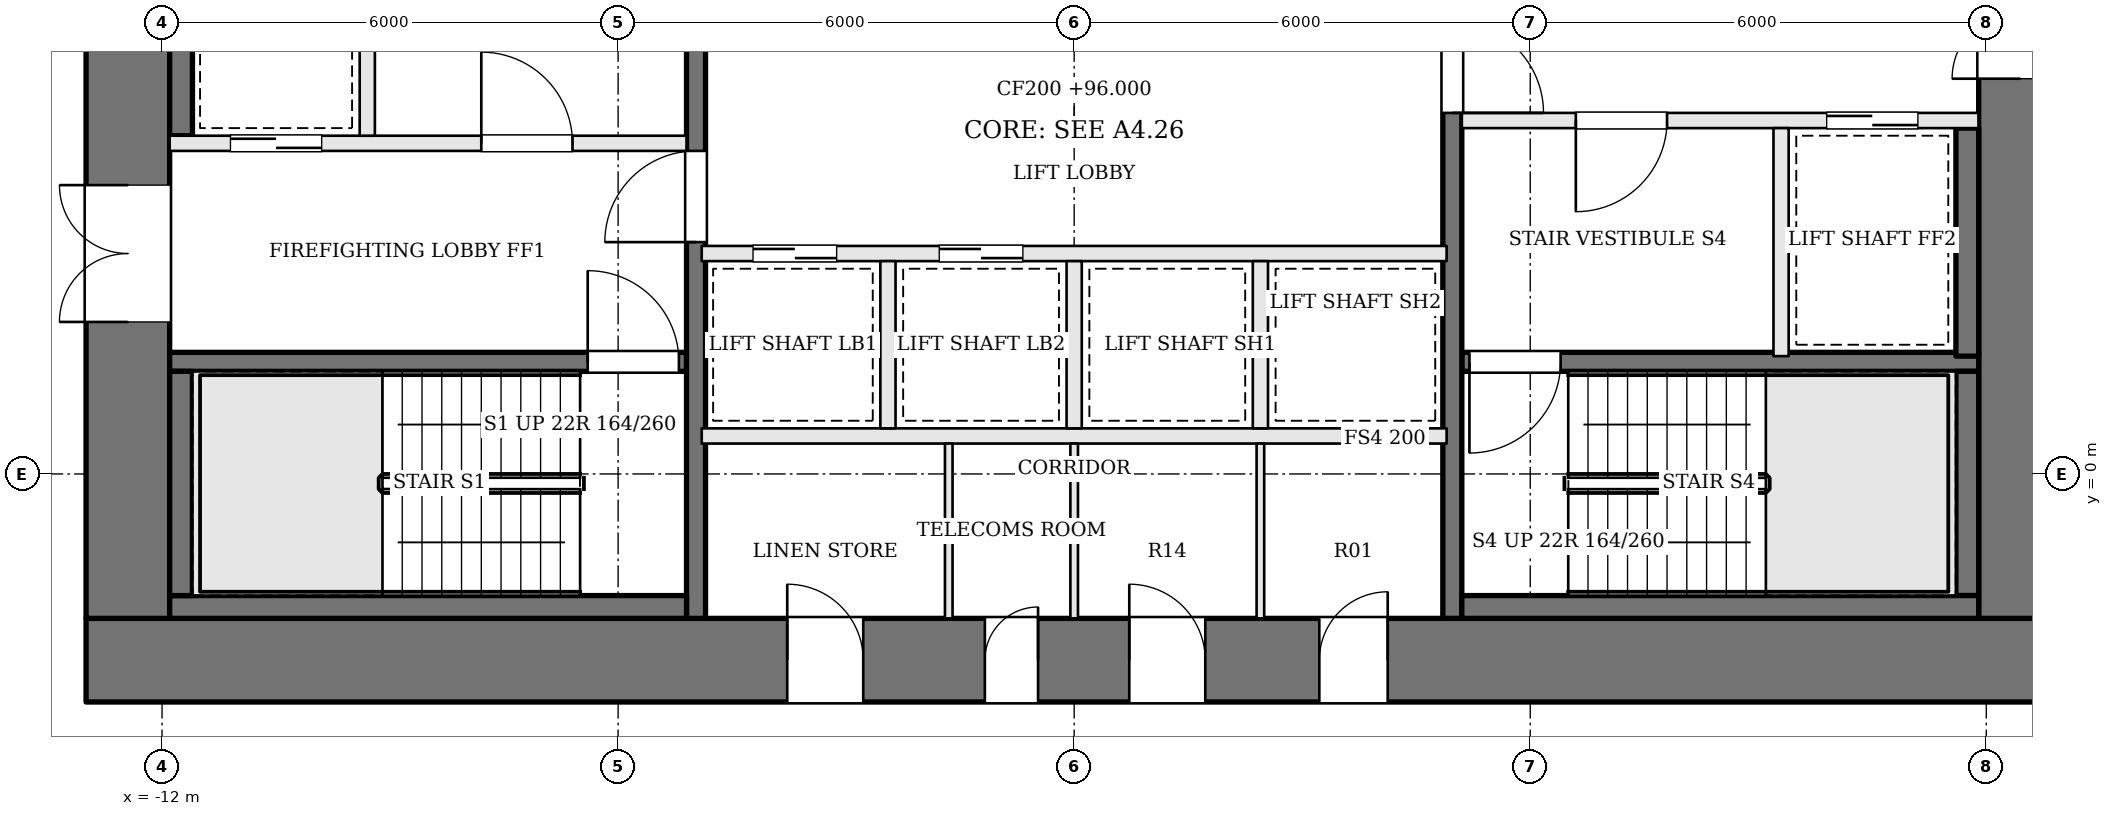
"""IFC4 building model, lengths in metres.
Left out: names, types, materials, properties, quantities, classifications, styles, units other than length and angle.
Written with IfcOpenShell. Run it as: python <this file> out.ifc"""

import sys

from ifc_helpers import new_model, si_unit, direction, frame, frame_2d, origin, place, context, subcontext, project, spatial, rectangle, extrude, element, fill, save


model = new_model("IFC4")
c1 = context("Model", 3, precision=1e-05, world=origin(), true_north=direction((0.0, 1.0)))
c2 = subcontext(c1, "Body", "Model", "MODEL_VIEW")
j1 = project(units=[si_unit("LENGTHUNIT", "METRE"), si_unit("PLANEANGLEUNIT", "RADIAN")], contexts=[c1])
p1 = place(None, origin())
s1 = spatial("IfcSite", under=j1, at=p1, CompositionType="ELEMENT")
p2 = place(p1, origin())
s2 = spatial("IfcBuilding", under=s1, at=p2, CompositionType="ELEMENT")
p3 = place(p2, frame((0.0, 0.0, 96.0)))
s3 = spatial("IfcBuildingStorey", under=s2, at=p3, CompositionType="ELEMENT", Elevation=96.0)
p4 = place(p3, frame((-13.0, -2.45, 0.0), z_axis=(0.0, 0.0, 1.0), x_axis=(1.0, 0.0, 0.0)))
e1 = element("IfcWall", 1, at=p4, inside=s3, PredefinedType="SHEAR", context=c2, shape_type="SweptSolid", body=[
    extrude(rectangle(XDim=26.0, YDim=1.1, at=frame_2d((13.0, 0.0))), origin(), (0.0, 0.0, 1.0), 3.6),
])
p5 = place(p4, frame((9.225, 0.0, 0.0)))
e2 = element("IfcOpeningElement", 2, at=p5, cuts=e1, PredefinedType="OPENING", context=c2, shape_type="SweptSolid", body=[
    extrude(rectangle(XDim=1.0, YDim=2.1, at=frame_2d((0.5, 1.05))), frame((0.0, 0.56, 0.0), z_axis=(0.0, -1.0, 0.0), x_axis=(1.0, 0.0, 0.0)), (0.0, 0.0, 1.0), 1.12),
])
p6 = place(p4, frame((11.825, 0.0, 0.0)))
e3 = element("IfcOpeningElement", 3, at=p6, cuts=e1, PredefinedType="OPENING", context=c2, shape_type="SweptSolid", body=[
    extrude(rectangle(XDim=0.7, YDim=2.1, at=frame_2d((0.35, 1.05))), frame((0.0, 0.56, 0.0), z_axis=(0.0, -1.0, 0.0), x_axis=(1.0, 0.0, 0.0)), (0.0, 0.0, 1.0), 1.12),
])
p7 = place(p4, frame((13.725, 0.0, 0.0)))
e4 = element("IfcOpeningElement", 4, at=p7, cuts=e1, PredefinedType="OPENING", context=c2, shape_type="SweptSolid", body=[
    extrude(rectangle(XDim=1.0, YDim=2.1, at=frame_2d((0.5, 1.05))), frame((0.0, 0.56, 0.0), z_axis=(0.0, -1.0, 0.0), x_axis=(1.0, 0.0, 0.0)), (0.0, 0.0, 1.0), 1.12),
])
p8 = place(p4, frame((16.225, 0.0, 0.0)))
e5 = element("IfcOpeningElement", 5, at=p8, cuts=e1, PredefinedType="OPENING", context=c2, shape_type="SweptSolid", body=[
    extrude(rectangle(XDim=0.9, YDim=2.1, at=frame_2d((0.45, 1.05))), frame((0.0, 0.56, 0.0), z_axis=(0.0, -1.0, 0.0), x_axis=(1.0, 0.0, 0.0)), (0.0, 0.0, 1.0), 1.12),
])
p9 = place(p3, frame((12.45, -1.9, 0.0), z_axis=(0.0, 0.0, 1.0), x_axis=(0.0, 1.0, 0.0)))
e6 = element("IfcWall", 6, at=p9, inside=s3, PredefinedType="SHEAR", context=c2, shape_type="SweptSolid", body=[
    extrude(rectangle(XDim=12.8, YDim=1.1, at=frame_2d((6.4, 0.0))), origin(), (0.0, 0.0, 1.0), 3.6),
])
p10 = place(p9, frame((7.1, 0.0, 0.0)))
e7 = element("IfcOpeningElement", 7, at=p10, cuts=e6, PredefinedType="OPENING", context=c2, shape_type="SweptSolid", body=[
    extrude(rectangle(XDim=1.8, YDim=2.1, at=frame_2d((0.9, 1.05))), frame((0.0, 0.56, 0.0), z_axis=(0.0, -1.0, 0.0), x_axis=(1.0, 0.0, 0.0)), (0.0, 0.0, 1.0), 1.12),
])
p11 = place(p3, frame((-12.45, -1.9, 0.0), z_axis=(0.0, 0.0, 1.0), x_axis=(0.0, 1.0, 0.0)))
e8 = element("IfcWall", 8, at=p11, inside=s3, PredefinedType="SHEAR", context=c2, shape_type="SweptSolid", body=[
    extrude(rectangle(XDim=12.8, YDim=1.1, at=frame_2d((6.4, 0.0))), origin(), (0.0, 0.0, 1.0), 3.6),
])
p12 = place(p11, frame((3.9, 0.0, 0.0)))
e9 = element("IfcOpeningElement", 9, at=p12, cuts=e8, PredefinedType="OPENING", context=c2, shape_type="SweptSolid", body=[
    extrude(rectangle(XDim=1.8, YDim=2.1, at=frame_2d((0.9, 1.05))), frame((0.0, 0.56, 0.0), z_axis=(0.0, -1.0, 0.0), x_axis=(1.0, 0.0, 0.0)), (0.0, 0.0, 1.0), 1.12),
])
p13 = place(p3, frame((-11.9, 1.475, 0.0), z_axis=(0.0, 0.0, 1.0), x_axis=(1.0, 0.0, 0.0)))
e10 = element("IfcWall", 10, at=p13, inside=s3, PredefinedType="SOLIDWALL", context=c2, shape_type="SweptSolid", body=[
    extrude(rectangle(XDim=6.8, YDim=0.25, at=frame_2d((3.4, 0.0))), origin(), (0.0, 0.0, 1.0), 3.4),
])
p14 = place(p13, frame((5.5, 0.0, 0.0)))
e11 = element("IfcOpeningElement", 11, at=p14, cuts=e10, PredefinedType="OPENING", context=c2, shape_type="SweptSolid", body=[
    extrude(rectangle(XDim=1.2, YDim=2.1, at=frame_2d((0.6, 1.05))), frame((0.0, 0.135, 0.0), z_axis=(0.0, -1.0, 0.0), x_axis=(1.0, 0.0, 0.0)), (0.0, 0.0, 1.0), 0.27),
])
p15 = place(p3, frame((-11.9, 4.35, 0.0), z_axis=(0.0, 0.0, 1.0), x_axis=(1.0, 0.0, 0.0)))
e12 = element("IfcWall", 12, at=p15, inside=s3, PredefinedType="SOLIDWALL", context=c2, shape_type="SweptSolid", body=[
    extrude(rectangle(XDim=6.8, YDim=0.2, at=frame_2d((3.4, 0.0))), origin(), (0.0, 0.0, 1.0), 3.4),
])
p16 = place(p15, frame((4.1, 0.0, 0.0)))
e13 = element("IfcOpeningElement", 13, at=p16, cuts=e12, PredefinedType="OPENING", context=c2, shape_type="SweptSolid", body=[
    extrude(rectangle(XDim=1.2, YDim=2.1, at=frame_2d((0.6, 1.05))), frame((0.0, 0.11, 0.0), z_axis=(0.0, -1.0, 0.0), x_axis=(1.0, 0.0, 0.0)), (0.0, 0.0, 1.0), 0.22),
])
p17 = place(p15, frame((0.8, 0.0, 0.0)))
e14 = element("IfcOpeningElement", 14, at=p17, cuts=e12, PredefinedType="OPENING", context=c2, shape_type="SweptSolid", body=[
    extrude(rectangle(XDim=1.2, YDim=2.1, at=frame_2d((0.6, 1.05))), frame((0.0, 0.11, 0.0), z_axis=(0.0, -1.0, 0.0), x_axis=(1.0, 0.0, 0.0)), (0.0, 0.0, 1.0), 0.22),
])
p18 = place(p3, frame((11.9, 4.65, 0.0), z_axis=(0.0, 0.0, 1.0), x_axis=(-1.0, 0.0, 0.0)))
e15 = element("IfcWall", 15, at=p18, inside=s3, PredefinedType="SOLIDWALL", context=c2, shape_type="SweptSolid", body=[
    extrude(rectangle(XDim=6.8, YDim=0.2, at=frame_2d((3.4, 0.0))), origin(), (0.0, 0.0, 1.0), 3.4),
])
p19 = place(p18, frame((4.1, 0.0, 0.0)))
e16 = element("IfcOpeningElement", 16, at=p19, cuts=e15, PredefinedType="OPENING", context=c2, shape_type="SweptSolid", body=[
    extrude(rectangle(XDim=1.2, YDim=2.1, at=frame_2d((0.6, 1.05))), frame((0.0, 0.11, 0.0), z_axis=(0.0, -1.0, 0.0), x_axis=(1.0, 0.0, 0.0)), (0.0, 0.0, 1.0), 0.22),
])
p20 = place(p18, frame((0.8, 0.0, 0.0)))
e17 = element("IfcOpeningElement", 17, at=p20, cuts=e15, PredefinedType="OPENING", context=c2, shape_type="SweptSolid", body=[
    extrude(rectangle(XDim=1.2, YDim=2.1, at=frame_2d((0.6, 1.05))), frame((0.0, 0.11, 0.0), z_axis=(0.0, -1.0, 0.0), x_axis=(1.0, 0.0, 0.0)), (0.0, 0.0, 1.0), 0.22),
])
p21 = place(p3, frame((11.9, 1.475, 0.0), z_axis=(0.0, 0.0, 1.0), x_axis=(-1.0, 0.0, 0.0)))
e18 = element("IfcWall", 18, at=p21, inside=s3, PredefinedType="SOLIDWALL", context=c2, shape_type="SweptSolid", body=[
    extrude(rectangle(XDim=6.8, YDim=0.25, at=frame_2d((3.4, 0.0))), origin(), (0.0, 0.0, 1.0), 3.4),
])
p22 = place(p21, frame((5.5, 0.0, 0.0)))
e19 = element("IfcOpeningElement", 19, at=p22, cuts=e18, PredefinedType="OPENING", context=c2, shape_type="SweptSolid", body=[
    extrude(rectangle(XDim=1.2, YDim=2.1, at=frame_2d((0.6, 1.05))), frame((0.0, 0.135, 0.0), z_axis=(0.0, -1.0, 0.0), x_axis=(1.0, 0.0, 0.0)), (0.0, 0.0, 1.0), 0.27),
])
for number, where, z_axis, x_axis in (
    (20, (-9.3, 4.45, 0.0), (0.0, 0.0, 1.0), (0.0, 1.0, 0.0)),
    (21, (9.3, 4.55, 0.0), (0.0, 0.0, 1.0), (0.0, -1.0, 0.0)),
):
    element("IfcWall", number, at=place(p3, frame(where, z_axis=z_axis, x_axis=x_axis)), inside=s3, PredefinedType="SOLIDWALL", context=c2, shape_type="SweptSolid", body=[
        extrude(rectangle(XDim=3.0, YDim=0.2, at=frame_2d((1.5, 0.0))), origin(), (0.0, 0.0, 1.0), 3.4),
    ])
p23 = place(p3, frame((-4.975, -1.9, 0.0), z_axis=(0.0, 0.0, 1.0), x_axis=(0.0, 1.0, 0.0)))
e22 = element("IfcWall", 22, at=p23, inside=s3, PredefinedType="SOLIDWALL", context=c2, shape_type="SweptSolid", body=[
    extrude(rectangle(XDim=12.8, YDim=0.25, at=frame_2d((6.4, 0.0))), origin(), (0.0, 0.0, 1.0), 3.4),
])
p24 = place(p23, frame((4.95, 0.0, 0.0)))
e23 = element("IfcOpeningElement", 23, at=p24, cuts=e22, PredefinedType="OPENING", context=c2, shape_type="SweptSolid", body=[
    extrude(rectangle(XDim=1.2, YDim=2.1, at=frame_2d((0.6, 1.05))), frame((0.0, 0.135, 0.0), z_axis=(0.0, -1.0, 0.0), x_axis=(1.0, 0.0, 0.0)), (0.0, 0.0, 1.0), 0.27),
])
p25 = place(p3, frame((4.975, 10.9, 0.0), z_axis=(0.0, 0.0, 1.0), x_axis=(0.0, -1.0, 0.0)))
e24 = element("IfcWall", 24, at=p25, inside=s3, PredefinedType="SOLIDWALL", context=c2, shape_type="SweptSolid", body=[
    extrude(rectangle(XDim=12.8, YDim=0.25, at=frame_2d((6.4, 0.0))), origin(), (0.0, 0.0, 1.0), 3.4),
])
p26 = place(p25, frame((4.95, 0.0, 0.0)))
e25 = element("IfcOpeningElement", 25, at=p26, cuts=e24, PredefinedType="OPENING", context=c2, shape_type="SweptSolid", body=[
    extrude(rectangle(XDim=1.2, YDim=2.1, at=frame_2d((0.6, 1.05))), frame((0.0, 0.135, 0.0), z_axis=(0.0, -1.0, 0.0), x_axis=(1.0, 0.0, 0.0)), (0.0, 0.0, 1.0), 0.27),
])
p27 = place(p3, frame((-11.9, -1.75, 0.0), z_axis=(0.0, 0.0, 1.0), x_axis=(1.0, 0.0, 0.0)))
e26 = element("IfcWall", 26, at=p27, inside=s3, PredefinedType="SOLIDWALL", context=c2, shape_type="SweptSolid", body=[
    extrude(rectangle(XDim=6.8, YDim=0.3, at=frame_2d((3.4, 0.0))), origin(), (0.0, 0.0, 1.0), 3.4),
])
p28 = place(p3, frame((-11.75, -1.6, 0.0), z_axis=(0.0, 0.0, 1.0), x_axis=(0.0, 1.0, 0.0)))
e27 = element("IfcWall", 27, at=p28, inside=s3, PredefinedType="SOLIDWALL", context=c2, shape_type="SweptSolid", body=[
    extrude(rectangle(XDim=2.95, YDim=0.3, at=frame_2d((1.475, 0.0))), origin(), (0.0, 0.0, 1.0), 3.4),
])
for number, where, z_axis, x_axis in (
    (28, (-11.75, 4.45, 0.0), (0.0, 0.0, 1.0), (0.0, 1.0, 0.0)),
    (29, (11.75, 4.55, 0.0), (0.0, 0.0, 1.0), (0.0, -1.0, 0.0)),
):
    element("IfcWall", number, at=place(p3, frame(where, z_axis=z_axis, x_axis=x_axis)), inside=s3, PredefinedType="SOLIDWALL", context=c2, shape_type="SweptSolid", body=[
        extrude(rectangle(XDim=3.0, YDim=0.3, at=frame_2d((1.5, 0.0))), origin(), (0.0, 0.0, 1.0), 3.4),
    ])
p29 = place(p3, frame((11.75, 1.35, 0.0), z_axis=(0.0, 0.0, 1.0), x_axis=(0.0, -1.0, 0.0)))
e30 = element("IfcWall", 30, at=p29, inside=s3, PredefinedType="SOLIDWALL", context=c2, shape_type="SweptSolid", body=[
    extrude(rectangle(XDim=2.95, YDim=0.3, at=frame_2d((1.475, 0.0))), origin(), (0.0, 0.0, 1.0), 3.4),
])
p30 = place(p3, frame((11.9, -1.75, 0.0), z_axis=(0.0, 0.0, 1.0), x_axis=(-1.0, 0.0, 0.0)))
e31 = element("IfcWall", 31, at=p30, inside=s3, PredefinedType="SOLIDWALL", context=c2, shape_type="SweptSolid", body=[
    extrude(rectangle(XDim=6.8, YDim=0.3, at=frame_2d((3.4, 0.0))), origin(), (0.0, 0.0, 1.0), 3.4),
])
p31 = place(p3, frame((-4.9, 0.5, 0.0), z_axis=(0.0, 0.0, 1.0), x_axis=(1.0, 0.0, 0.0)))
e32 = element("IfcWall", 32, at=p31, inside=s3, PredefinedType="SOLIDWALL", context=c2, shape_type="SweptSolid", body=[
    extrude(rectangle(XDim=9.8, YDim=0.2, at=frame_2d((4.9, 0.0))), origin(), (0.0, 0.0, 1.0), 3.4),
])
p32 = place(p3, frame((-4.9, 2.9, 0.0), z_axis=(0.0, 0.0, 1.0), x_axis=(1.0, 0.0, 0.0)))
e33 = element("IfcWall", 33, at=p32, inside=s3, PredefinedType="SOLIDWALL", context=c2, shape_type="SweptSolid", body=[
    extrude(rectangle(XDim=9.8, YDim=0.2, at=frame_2d((4.9, 0.0))), origin(), (0.0, 0.0, 1.0), 3.4),
])
p33 = place(p32, frame((0.675, 0.0, 0.0)))
e34 = element("IfcOpeningElement", 34, at=p33, cuts=e33, PredefinedType="OPENING", context=c2, shape_type="SweptSolid", body=[
    extrude(rectangle(XDim=1.1, YDim=2.1, at=frame_2d((0.55, 1.05))), frame((0.0, 0.11, 0.0), z_axis=(0.0, -1.0, 0.0), x_axis=(1.0, 0.0, 0.0)), (0.0, 0.0, 1.0), 0.22),
])
p34 = place(p32, frame((3.125, 0.0, 0.0)))
e35 = element("IfcOpeningElement", 35, at=p34, cuts=e33, PredefinedType="OPENING", context=c2, shape_type="SweptSolid", body=[
    extrude(rectangle(XDim=1.1, YDim=2.1, at=frame_2d((0.55, 1.05))), frame((0.0, 0.11, 0.0), z_axis=(0.0, -1.0, 0.0), x_axis=(1.0, 0.0, 0.0)), (0.0, 0.0, 1.0), 0.22),
])
for number, where, z_axis, x_axis in (
    (36, (-2.45, 0.6, 0.0), (0.0, 0.0, 1.0), (0.0, 1.0, 0.0)),
    (37, (0.0, 0.6, 0.0), (0.0, 0.0, 1.0), (0.0, 1.0, 0.0)),
    (38, (2.45, 0.6, 0.0), (0.0, 0.0, 1.0), (0.0, 1.0, 0.0)),
):
    element("IfcWall", number, at=place(p3, frame(where, z_axis=z_axis, x_axis=x_axis)), inside=s3, PredefinedType="SOLIDWALL", context=c2, shape_type="SweptSolid", body=[
        extrude(rectangle(XDim=2.2, YDim=0.2, at=frame_2d((1.1, 0.0))), origin(), (0.0, 0.0, 1.0), 3.4),
    ])
for number, where, z_axis, x_axis in (
    (39, (-1.65, -1.9, 0.0), (0.0, 0.0, 1.0), (0.0, 1.0, 0.0)),
    (40, (0.0, -1.9, 0.0), (0.0, 0.0, 1.0), (0.0, 1.0, 0.0)),
    (41, (2.45, -1.9, 0.0), (0.0, 0.0, 1.0), (0.0, 1.0, 0.0)),
):
    element("IfcWall", number, at=place(p3, frame(where, z_axis=z_axis, x_axis=x_axis)), inside=s3, PredefinedType="PARTITIONING", context=c2, shape_type="SweptSolid", body=[
        extrude(rectangle(XDim=2.3, YDim=0.1, at=frame_2d((1.15, 0.0))), origin(), (0.0, 0.0, 1.0), 3.4),
    ])
p35 = place(p12, origin())
e42 = element("IfcDoor", 42, at=p35, inside=s3, OperationType="DOUBLE_DOOR_SINGLE_SWING", PredefinedType="DOOR", context=c2, shape_type="SweptSolid", body=[
    extrude(rectangle(XDim=1.8, YDim=2.1, at=frame_2d((0.9, 1.05))), frame((0.0, 0.025, 0.0), z_axis=(0.0, -1.0, 0.0), x_axis=(1.0, 0.0, 0.0)), (0.0, 0.0, 1.0), 0.05),
])
fill(e9, e42)
p36 = place(p10, origin())
e43 = element("IfcDoor", 43, at=p36, inside=s3, OperationType="DOUBLE_DOOR_SINGLE_SWING", PredefinedType="DOOR", context=c2, shape_type="SweptSolid", body=[
    extrude(rectangle(XDim=1.8, YDim=2.1, at=frame_2d((0.9, 1.05))), frame((0.0, 0.025, 0.0), z_axis=(0.0, -1.0, 0.0), x_axis=(1.0, 0.0, 0.0)), (0.0, 0.0, 1.0), 0.05),
])
fill(e7, e43)
p37 = place(p24, origin())
e44 = element("IfcDoor", 44, at=p37, inside=s3, OperationType="SINGLE_SWING_LEFT", PredefinedType="DOOR", context=c2, shape_type="SweptSolid", body=[
    extrude(rectangle(XDim=1.2, YDim=2.1, at=frame_2d((0.6, 1.05))), frame((0.0, 0.025, 0.0), z_axis=(0.0, -1.0, 0.0), x_axis=(1.0, 0.0, 0.0)), (0.0, 0.0, 1.0), 0.05),
])
fill(e23, e44)
p38 = place(p26, origin())
e45 = element("IfcDoor", 45, at=p38, inside=s3, OperationType="SINGLE_SWING_RIGHT", PredefinedType="DOOR", context=c2, shape_type="SweptSolid", body=[
    extrude(rectangle(XDim=1.2, YDim=2.1, at=frame_2d((0.6, 1.05))), frame((0.0, 0.025, 0.0), z_axis=(0.0, -1.0, 0.0), x_axis=(1.0, 0.0, 0.0)), (0.0, 0.0, 1.0), 0.05),
])
fill(e25, e45)
p39 = place(p16, origin())
e46 = element("IfcDoor", 46, at=p39, inside=s3, OperationType="SINGLE_SWING_LEFT", PredefinedType="DOOR", context=c2, shape_type="SweptSolid", body=[
    extrude(rectangle(XDim=1.2, YDim=2.1, at=frame_2d((0.6, 1.05))), frame((0.0, 0.025, 0.0), z_axis=(0.0, -1.0, 0.0), x_axis=(1.0, 0.0, 0.0)), (0.0, 0.0, 1.0), 0.05),
])
fill(e13, e46)
p40 = place(p19, origin())
e47 = element("IfcDoor", 47, at=p40, inside=s3, OperationType="SINGLE_SWING_RIGHT", PredefinedType="DOOR", context=c2, shape_type="SweptSolid", body=[
    extrude(rectangle(XDim=1.2, YDim=2.1, at=frame_2d((0.6, 1.05))), frame((0.0, 0.025, 0.0), z_axis=(0.0, -1.0, 0.0), x_axis=(1.0, 0.0, 0.0)), (0.0, 0.0, 1.0), 0.05),
])
fill(e16, e47)
p41 = place(p14, origin())
e48 = element("IfcDoor", 48, at=p41, inside=s3, OperationType="SINGLE_SWING_LEFT", PredefinedType="DOOR", context=c2, shape_type="SweptSolid", body=[
    extrude(rectangle(XDim=1.2, YDim=2.1, at=frame_2d((0.6, 1.05))), frame((0.0, 0.025, 0.0), z_axis=(0.0, -1.0, 0.0), x_axis=(1.0, 0.0, 0.0)), (0.0, 0.0, 1.0), 0.05),
])
fill(e11, e48)
p42 = place(p22, origin())
e49 = element("IfcDoor", 49, at=p42, inside=s3, OperationType="SINGLE_SWING_RIGHT", PredefinedType="DOOR", context=c2, shape_type="SweptSolid", body=[
    extrude(rectangle(XDim=1.2, YDim=2.1, at=frame_2d((0.6, 1.05))), frame((0.0, 0.025, 0.0), z_axis=(0.0, -1.0, 0.0), x_axis=(1.0, 0.0, 0.0)), (0.0, 0.0, 1.0), 0.05),
])
fill(e19, e49)
p43 = place(p17, origin())
e50 = element("IfcDoor", 50, at=p43, inside=s3, OperationType="SLIDING_TO_RIGHT", PredefinedType="DOOR", context=c2, shape_type="SweptSolid", body=[
    extrude(rectangle(XDim=1.2, YDim=2.1, at=frame_2d((0.6, 1.05))), frame((0.0, 0.025, 0.0), z_axis=(0.0, -1.0, 0.0), x_axis=(1.0, 0.0, 0.0)), (0.0, 0.0, 1.0), 0.05),
])
fill(e14, e50)
p44 = place(p20, origin())
e51 = element("IfcDoor", 51, at=p44, inside=s3, OperationType="SLIDING_TO_RIGHT", PredefinedType="DOOR", context=c2, shape_type="SweptSolid", body=[
    extrude(rectangle(XDim=1.2, YDim=2.1, at=frame_2d((0.6, 1.05))), frame((0.0, 0.025, 0.0), z_axis=(0.0, -1.0, 0.0), x_axis=(1.0, 0.0, 0.0)), (0.0, 0.0, 1.0), 0.05),
])
fill(e17, e51)
p45 = place(p33, origin())
e52 = element("IfcDoor", 52, at=p45, inside=s3, OperationType="SLIDING_TO_RIGHT", PredefinedType="DOOR", context=c2, shape_type="SweptSolid", body=[
    extrude(rectangle(XDim=1.1, YDim=2.1, at=frame_2d((0.55, 1.05))), frame((0.0, 0.025, 0.0), z_axis=(0.0, -1.0, 0.0), x_axis=(1.0, 0.0, 0.0)), (0.0, 0.0, 1.0), 0.05),
])
fill(e34, e52)
p46 = place(p34, origin())
e53 = element("IfcDoor", 53, at=p46, inside=s3, OperationType="SLIDING_TO_LEFT", PredefinedType="DOOR", context=c2, shape_type="SweptSolid", body=[
    extrude(rectangle(XDim=1.1, YDim=2.1, at=frame_2d((0.55, 1.05))), frame((0.0, 0.025, 0.0), z_axis=(0.0, -1.0, 0.0), x_axis=(1.0, 0.0, 0.0)), (0.0, 0.0, 1.0), 0.05),
])
fill(e35, e53)
p47 = place(p5, origin())
e54 = element("IfcDoor", 54, at=p47, inside=s3, OperationType="SINGLE_SWING_LEFT", PredefinedType="DOOR", context=c2, shape_type="SweptSolid", body=[
    extrude(rectangle(XDim=1.0, YDim=2.1, at=frame_2d((0.5, 1.05))), frame((0.0, 0.025, 0.0), z_axis=(0.0, -1.0, 0.0), x_axis=(1.0, 0.0, 0.0)), (0.0, 0.0, 1.0), 0.05),
])
fill(e2, e54)
p48 = place(p6, origin())
e55 = element("IfcDoor", 55, at=p48, inside=s3, OperationType="SINGLE_SWING_RIGHT", PredefinedType="DOOR", context=c2, shape_type="SweptSolid", body=[
    extrude(rectangle(XDim=0.7, YDim=2.1, at=frame_2d((0.35, 1.05))), frame((0.0, 0.025, 0.0), z_axis=(0.0, -1.0, 0.0), x_axis=(1.0, 0.0, 0.0)), (0.0, 0.0, 1.0), 0.05),
])
fill(e3, e55)
p49 = place(p7, origin())
e56 = element("IfcDoor", 56, at=p49, inside=s3, OperationType="SINGLE_SWING_LEFT", PredefinedType="DOOR", context=c2, shape_type="SweptSolid", body=[
    extrude(rectangle(XDim=1.0, YDim=2.1, at=frame_2d((0.5, 1.05))), frame((0.0, 0.025, 0.0), z_axis=(0.0, -1.0, 0.0), x_axis=(1.0, 0.0, 0.0)), (0.0, 0.0, 1.0), 0.05),
])
fill(e4, e56)
p50 = place(p8, origin())
e57 = element("IfcDoor", 57, at=p50, inside=s3, OperationType="SINGLE_SWING_RIGHT", PredefinedType="DOOR", context=c2, shape_type="SweptSolid", body=[
    extrude(rectangle(XDim=0.9, YDim=2.1, at=frame_2d((0.45, 1.05))), frame((0.0, 0.025, 0.0), z_axis=(0.0, -1.0, 0.0), x_axis=(1.0, 0.0, 0.0)), (0.0, 0.0, 1.0), 0.05),
])
fill(e5, e57)
save(model, sys.argv[1])
